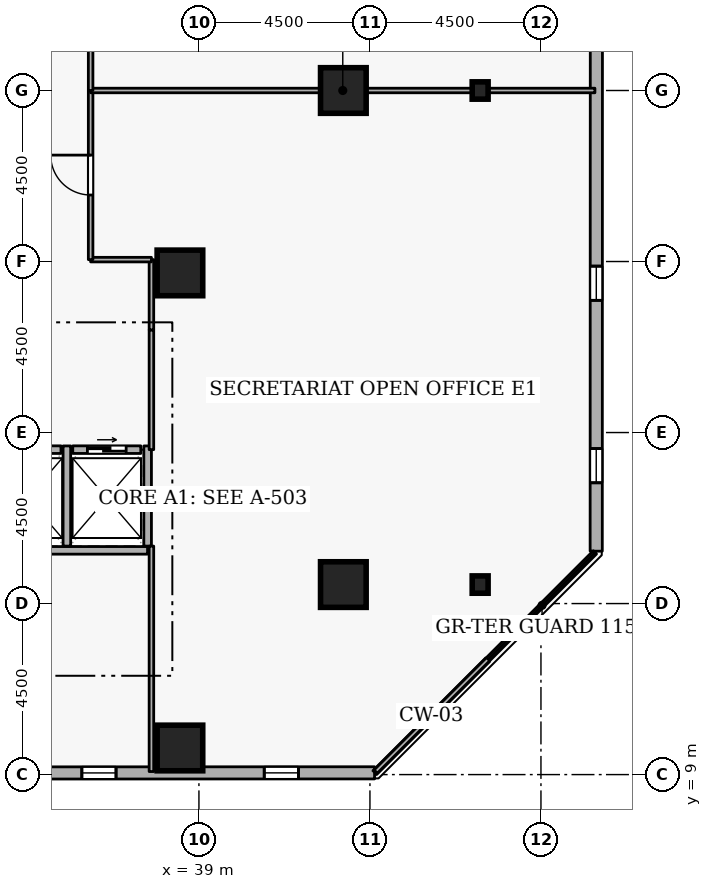
"""IFC4 building model, lengths in metres.
Left out: names, types, materials, properties, quantities, classifications, styles, units other than length and angle.
Written with IfcOpenShell. Run it as: python <this file> out.ifc"""

import sys

from ifc_helpers import new_model, si_unit, direction, frame, frame_2d, origin, origin_2d, place, context, subcontext, project, spatial, rectangle, i_section, extrude, element, fill, save


model = new_model("IFC4")
c1 = context("Model", 3, precision=1e-05, world=origin(), true_north=direction((0.0, 1.0)))
c2 = subcontext(c1, "Body", "Model", "MODEL_VIEW")
j1 = project(units=[si_unit("LENGTHUNIT", "METRE"), si_unit("PLANEANGLEUNIT", "RADIAN")], contexts=[c1])
p1 = place(None, origin())
s1 = spatial("IfcSite", under=j1, at=p1, CompositionType="ELEMENT")
p2 = place(p1, origin())
s2 = spatial("IfcBuilding", under=s1, at=p2, CompositionType="ELEMENT")
p3 = place(p2, frame((0.0, 0.0, 80.1)))
s3 = spatial("IfcBuildingStorey", under=s2, at=p3, CompositionType="ELEMENT", Elevation=80.1)
for number, where, z_axis, x_axis in (
    (1, (38.5, 9.7, 0.0), (0.0, 0.0, 1.0), (1.0, 0.0, 0.0)),
    (2, (42.8, 14.0, 0.0), (0.0, 0.0, 1.0), (1.0, 0.0, 0.0)),
    (3, (42.8, 27.0, 0.0), (0.0, 0.0, 1.0), (1.0, 0.0, 0.0)),
    (4, (38.5, 22.2, 0.0), (0.0, 0.0, 1.0), (1.0, 0.0, 0.0)),
):
    element("IfcColumn", number, at=place(p3, frame(where, z_axis=z_axis, x_axis=x_axis)), inside=s3, PredefinedType="COLUMN", context=c2, shape_type="SweptSolid", body=[
        extrude(rectangle(XDim=1.2, YDim=1.2, at=origin_2d()), origin(), (0.0, 0.0, 1.0), 3.6),
    ])
for number, where, z_axis, x_axis in (
    (5, (46.4, 14.0, 0.0), (0.0, 0.0, 1.0), (1.0, 0.0, 0.0)),
    (6, (46.4, 27.0, 0.0), (0.0, 0.0, 1.0), (1.0, 0.0, 0.0)),
):
    element("IfcColumn", number, at=place(p3, frame(where, z_axis=z_axis, x_axis=x_axis)), inside=s3, PredefinedType="COLUMN", context=c2, shape_type="SweptSolid", body=[
        extrude(i_section(OverallWidth=0.418, OverallDepth=0.456, WebThickness=0.042, FlangeThickness=0.067, FilletRadius=0.015, at=origin_2d()), origin(), (0.0, 0.0, 1.0), 3.6),
    ])
p4 = place(p3, frame((10.119, 9.035, 0.0), z_axis=(0.0, 0.0, 1.0), x_axis=(0.999999950907, 0.000313347115, 0.0)))
e7 = element("IfcWall", 7, at=p4, inside=s3, PredefinedType="STANDARD", context=c2, shape_type="SweptSolid", body=[
    extrude(rectangle(XDim=33.503, YDim=0.32, at=frame_2d((16.751, 0.0))), origin(), (0.0, 0.0, 1.0), 2.7),
])
p5 = place(p4, frame((6.6, 0.0, 0.72)))
e8 = element("IfcOpeningElement", 8, at=p5, cuts=e7, PredefinedType="OPENING", context=c2, shape_type="SweptSolid", body=[
    extrude(rectangle(XDim=0.9, YDim=1.75, at=frame_2d((0.45, 0.875))), frame((0.0, 0.17, 0.0), z_axis=(0.0, -1.0, 0.0), x_axis=(1.0, 0.0, 0.0)), (0.0, 0.0, 1.0), 0.34),
])
p6 = place(p4, frame((11.4, 0.0, 0.72)))
e9 = element("IfcOpeningElement", 9, at=p6, cuts=e7, PredefinedType="OPENING", context=c2, shape_type="SweptSolid", body=[
    extrude(rectangle(XDim=0.9, YDim=1.75, at=frame_2d((0.45, 0.875))), frame((0.0, 0.17, 0.0), z_axis=(0.0, -1.0, 0.0), x_axis=(1.0, 0.0, 0.0)), (0.0, 0.0, 1.0), 0.34),
])
p7 = place(p4, frame((21.0, 0.0, 0.72)))
e10 = element("IfcOpeningElement", 10, at=p7, cuts=e7, PredefinedType="OPENING", context=c2, shape_type="SweptSolid", body=[
    extrude(rectangle(XDim=0.9, YDim=1.75, at=frame_2d((0.45, 0.875))), frame((0.0, 0.17, 0.0), z_axis=(0.0, -1.0, 0.0), x_axis=(1.0, 0.0, 0.0)), (0.0, 0.0, 1.0), 0.34),
])
p8 = place(p4, frame((25.8, 0.0, 0.72)))
e11 = element("IfcOpeningElement", 11, at=p8, cuts=e7, PredefinedType="OPENING", context=c2, shape_type="SweptSolid", body=[
    extrude(rectangle(XDim=0.9, YDim=1.75, at=frame_2d((0.45, 0.875))), frame((0.0, 0.17, 0.0), z_axis=(0.0, -1.0, 0.0), x_axis=(1.0, 0.0, 0.0)), (0.0, 0.0, 1.0), 0.34),
])
p9 = place(p4, frame((30.6, 0.0, 0.72)))
e12 = element("IfcOpeningElement", 12, at=p9, cuts=e7, PredefinedType="OPENING", context=c2, shape_type="SweptSolid", body=[
    extrude(rectangle(XDim=0.9, YDim=1.75, at=frame_2d((0.45, 0.875))), frame((0.0, 0.17, 0.0), z_axis=(0.0, -1.0, 0.0), x_axis=(1.0, 0.0, 0.0)), (0.0, 0.0, 1.0), 0.34),
])
p10 = place(p3, frame((49.454, 14.878, 0.0), z_axis=(0.0, 0.0, 1.0), x_axis=(0.000313347115, 0.999999950907, 0.0)))
e13 = element("IfcWall", 13, at=p10, inside=s3, PredefinedType="STANDARD", context=c2, shape_type="SweptSolid", body=[
    extrude(rectangle(XDim=33.503, YDim=0.32, at=frame_2d((16.751, 0.0))), origin(), (0.0, 0.0, 1.0), 2.7),
])
p11 = place(p10, frame((1.8, 0.0, 0.72)))
e14 = element("IfcOpeningElement", 14, at=p11, cuts=e13, PredefinedType="OPENING", context=c2, shape_type="SweptSolid", body=[
    extrude(rectangle(XDim=0.9, YDim=1.75, at=frame_2d((0.45, 0.875))), frame((0.0, 0.17, 0.0), z_axis=(0.0, -1.0, 0.0), x_axis=(1.0, 0.0, 0.0)), (0.0, 0.0, 1.0), 0.34),
])
p12 = place(p10, frame((6.6, 0.0, 0.72)))
e15 = element("IfcOpeningElement", 15, at=p12, cuts=e13, PredefinedType="OPENING", context=c2, shape_type="SweptSolid", body=[
    extrude(rectangle(XDim=0.9, YDim=1.75, at=frame_2d((0.45, 0.875))), frame((0.0, 0.17, 0.0), z_axis=(0.0, -1.0, 0.0), x_axis=(1.0, 0.0, 0.0)), (0.0, 0.0, 1.0), 0.34),
])
p13 = place(p10, frame((16.2, 0.0, 0.72)))
e16 = element("IfcOpeningElement", 16, at=p13, cuts=e13, PredefinedType="OPENING", context=c2, shape_type="SweptSolid", body=[
    extrude(rectangle(XDim=0.9, YDim=1.75, at=frame_2d((0.45, 0.875))), frame((0.0, 0.17, 0.0), z_axis=(0.0, -1.0, 0.0), x_axis=(1.0, 0.0, 0.0)), (0.0, 0.0, 1.0), 0.34),
])
p14 = place(p10, frame((21.0, 0.0, 0.72)))
e17 = element("IfcOpeningElement", 17, at=p14, cuts=e13, PredefinedType="OPENING", context=c2, shape_type="SweptSolid", body=[
    extrude(rectangle(XDim=0.9, YDim=1.75, at=frame_2d((0.45, 0.875))), frame((0.0, 0.17, 0.0), z_axis=(0.0, -1.0, 0.0), x_axis=(1.0, 0.0, 0.0)), (0.0, 0.0, 1.0), 0.34),
])
p15 = place(p10, frame((25.8, 0.0, 0.72)))
e18 = element("IfcOpeningElement", 18, at=p15, cuts=e13, PredefinedType="OPENING", context=c2, shape_type="SweptSolid", body=[
    extrude(rectangle(XDim=0.9, YDim=1.75, at=frame_2d((0.45, 0.875))), frame((0.0, 0.17, 0.0), z_axis=(0.0, -1.0, 0.0), x_axis=(1.0, 0.0, 0.0)), (0.0, 0.0, 1.0), 0.34),
])
p16 = place(p10, frame((30.6, 0.0, 0.72)))
e19 = element("IfcOpeningElement", 19, at=p16, cuts=e13, PredefinedType="OPENING", context=c2, shape_type="SweptSolid", body=[
    extrude(rectangle(XDim=0.9, YDim=1.75, at=frame_2d((0.45, 0.875))), frame((0.0, 0.17, 0.0), z_axis=(0.0, -1.0, 0.0), x_axis=(1.0, 0.0, 0.0)), (0.0, 0.0, 1.0), 0.34),
])
p17 = place(p3, frame((33.63, 17.55, 0.0), z_axis=(0.0, 0.0, 1.0), x_axis=(1.0, 0.0, 0.0)))
e20 = element("IfcWall", 20, at=p17, inside=s3, PredefinedType="STANDARD", context=c2, shape_type="SweptSolid", body=[
    extrude(rectangle(XDim=1.74, YDim=0.2, at=frame_2d((0.87, 0.0))), origin(), (0.0, 0.0, 1.0), 3.34),
])
p18 = place(p17, frame((0.36, 0.0, 0.0)))
e21 = element("IfcOpeningElement", 21, at=p18, cuts=e20, PredefinedType="OPENING", context=c2, shape_type="SweptSolid", body=[
    extrude(rectangle(XDim=1.02, YDim=2.06, at=frame_2d((0.51, 1.03))), frame((0.0, 0.11, 0.0), z_axis=(0.0, -1.0, 0.0), x_axis=(1.0, 0.0, 0.0)), (0.0, 0.0, 1.0), 0.22),
])
p19 = place(p3, frame((35.68, 17.55, 0.0), z_axis=(0.0, 0.0, 1.0), x_axis=(1.0, 0.0, 0.0)))
e22 = element("IfcWall", 22, at=p19, inside=s3, PredefinedType="STANDARD", context=c2, shape_type="SweptSolid", body=[
    extrude(rectangle(XDim=1.79, YDim=0.2, at=frame_2d((0.895, 0.0))), origin(), (0.0, 0.0, 1.0), 3.34),
])
p20 = place(p19, frame((0.385, 0.0, 0.0)))
e23 = element("IfcOpeningElement", 23, at=p20, cuts=e22, PredefinedType="OPENING", context=c2, shape_type="SweptSolid", body=[
    extrude(rectangle(XDim=1.02, YDim=2.06, at=frame_2d((0.51, 1.03))), frame((0.0, 0.11, 0.0), z_axis=(0.0, -1.0, 0.0), x_axis=(1.0, 0.0, 0.0)), (0.0, 0.0, 1.0), 0.22),
])
p21 = place(p3, frame((33.452, 14.9, 0.0), z_axis=(0.0, 0.0, 1.0), x_axis=(1.0, 0.0, 0.0)))
e24 = element("IfcWall", 24, at=p21, inside=s3, PredefinedType="STANDARD", context=c2, shape_type="SweptSolid", body=[
    extrude(rectangle(XDim=4.196, YDim=0.2, at=frame_2d((2.098, 0.0))), origin(), (0.0, 0.0, 1.0), 3.34),
])
for number, where, z_axis, x_axis in (
    (25, (35.525, 15.012, 0.0), (0.0, 0.0, 1.0), (0.0, 1.0, 0.0)),
    (26, (37.65, 15.012, 0.0), (0.0, 0.0, 1.0), (0.0, 1.0, 0.0)),
):
    element("IfcWall", number, at=place(p3, frame(where, z_axis=z_axis, x_axis=x_axis)), inside=s3, PredefinedType="STANDARD", context=c2, shape_type="SweptSolid", body=[
        extrude(rectangle(XDim=2.636, YDim=0.2, at=frame_2d((1.318, 0.0))), origin(), (0.0, 0.0, 1.0), 3.34),
    ])
p22 = place(p3, frame((37.75, 17.55, 0.0), z_axis=(0.0, 0.0, 1.0), x_axis=(0.0, 1.0, 0.0)))
e27 = element("IfcWall", 27, at=p22, inside=s3, PredefinedType="PARTITIONING", context=c2, shape_type="SweptSolid", body=[
    extrude(rectangle(XDim=3.15, YDim=0.12, at=frame_2d((1.575, 0.0))), origin(), (0.0, 0.0, 1.0), 3.34),
])
p23 = place(p3, frame((37.75, 20.7, 0.0), z_axis=(0.0, 0.0, 1.0), x_axis=(0.0, 1.0, 0.0)))
e28 = element("IfcWall", 28, at=p23, inside=s3, PredefinedType="PARTITIONING", context=c2, shape_type="SweptSolid", body=[
    extrude(rectangle(XDim=1.85, YDim=0.12, at=frame_2d((0.925, 0.0))), origin(), (0.0, 0.0, 1.0), 3.34),
])
p24 = place(p3, frame((37.75, 22.55, 0.0), z_axis=(0.0, 0.0, 1.0), x_axis=(-1.0, 0.0, 0.0)))
e29 = element("IfcWall", 29, at=p24, inside=s3, PredefinedType="PARTITIONING", context=c2, shape_type="SweptSolid", body=[
    extrude(rectangle(XDim=1.6, YDim=0.12, at=frame_2d((0.8, 0.0))), origin(), (0.0, 0.0, 1.0), 3.34),
])
p25 = place(p3, frame((36.15, 22.55, 0.0), z_axis=(0.0, 0.0, 1.0), x_axis=(0.0, 1.0, 0.0)))
e30 = element("IfcWall", 30, at=p25, inside=s3, PredefinedType="PARTITIONING", context=c2, shape_type="SweptSolid", body=[
    extrude(rectangle(XDim=4.45, YDim=0.12, at=frame_2d((2.225, 0.0))), origin(), (0.0, 0.0, 1.0), 3.34),
])
p26 = place(p25, frame((1.7, 0.0, 0.0)))
e31 = element("IfcOpeningElement", 31, at=p26, cuts=e30, PredefinedType="OPENING", context=c2, shape_type="SweptSolid", body=[
    extrude(rectangle(XDim=1.05, YDim=2.1, at=frame_2d((0.525, 1.05))), frame((0.0, 0.07, 0.0), z_axis=(0.0, -1.0, 0.0), x_axis=(1.0, 0.0, 0.0)), (0.0, 0.0, 1.0), 0.14),
])
p27 = place(p3, frame((36.15, 27.0, 0.0), z_axis=(0.0, 0.0, 1.0), x_axis=(1.0, 0.0, 0.0)))
e32 = element("IfcWall", 32, at=p27, inside=s3, PredefinedType="PARTITIONING", context=c2, shape_type="SweptSolid", body=[
    extrude(rectangle(XDim=13.27, YDim=0.12, at=frame_2d((6.635, 0.0))), origin(), (0.0, 0.0, 1.0), 2.882),
])
p28 = place(p3, frame((49.42, 14.848, 0.0), z_axis=(0.0, 0.0, 1.0), x_axis=(-0.707106781187, -0.707106781187, 0.0)))
e33 = element("IfcWall", 33, at=p28, inside=s3, PredefinedType="PARTITIONING", context=c2, shape_type="SweptSolid", body=[
    extrude(rectangle(XDim=8.156, YDim=0.12, at=frame_2d((4.078, 0.0))), origin(), (0.0, 0.0, 1.0), 3.34),
])
p29 = place(p3, frame((37.75, 9.08, 0.0), z_axis=(0.0, 0.0, 1.0), x_axis=(0.0, 1.0, 0.0)))
e34 = element("IfcWall", 34, at=p29, inside=s3, PredefinedType="PARTITIONING", context=c2, shape_type="SweptSolid", body=[
    extrude(rectangle(XDim=5.932, YDim=0.12, at=frame_2d((2.966, 0.0))), origin(), (0.0, 0.0, 1.0), 3.34),
])
p30 = place(p3, frame((36.15, 27.0, 0.0), z_axis=(0.0, 0.0, 1.0), x_axis=(0.0, 1.0, 0.0)))
e35 = element("IfcWall", 35, at=p30, inside=s3, PredefinedType="PARTITIONING", context=c2, shape_type="SweptSolid", body=[
    extrude(rectangle(XDim=4.45, YDim=0.12, at=frame_2d((2.225, 0.0))), origin(), (0.0, 0.0, 1.0), 3.34),
])
p31 = place(p8, origin())
e36 = element("IfcWindow", 36, at=p31, inside=s3, PartitioningType="SINGLE_PANEL", PredefinedType="WINDOW", context=c2, shape_type="SweptSolid", body=[
    extrude(rectangle(XDim=0.9, YDim=1.75, at=frame_2d((0.45, 0.875))), frame((0.0, 0.03, 0.0), z_axis=(0.0, -1.0, 0.0), x_axis=(1.0, 0.0, 0.0)), (0.0, 0.0, 1.0), 0.06),
])
fill(e11, e36)
p32 = place(p9, origin())
e37 = element("IfcWindow", 37, at=p32, inside=s3, PartitioningType="SINGLE_PANEL", PredefinedType="WINDOW", context=c2, shape_type="SweptSolid", body=[
    extrude(rectangle(XDim=0.9, YDim=1.75, at=frame_2d((0.45, 0.875))), frame((0.0, 0.03, 0.0), z_axis=(0.0, -1.0, 0.0), x_axis=(1.0, 0.0, 0.0)), (0.0, 0.0, 1.0), 0.06),
])
fill(e12, e37)
p33 = place(p11, origin())
e38 = element("IfcWindow", 38, at=p33, inside=s3, PartitioningType="SINGLE_PANEL", PredefinedType="WINDOW", context=c2, shape_type="SweptSolid", body=[
    extrude(rectangle(XDim=0.9, YDim=1.75, at=frame_2d((0.45, 0.875))), frame((0.0, 0.03, 0.0), z_axis=(0.0, -1.0, 0.0), x_axis=(1.0, 0.0, 0.0)), (0.0, 0.0, 1.0), 0.06),
])
fill(e14, e38)
p34 = place(p12, origin())
e39 = element("IfcWindow", 39, at=p34, inside=s3, PartitioningType="SINGLE_PANEL", PredefinedType="WINDOW", context=c2, shape_type="SweptSolid", body=[
    extrude(rectangle(XDim=0.9, YDim=1.75, at=frame_2d((0.45, 0.875))), frame((0.0, 0.03, 0.0), z_axis=(0.0, -1.0, 0.0), x_axis=(1.0, 0.0, 0.0)), (0.0, 0.0, 1.0), 0.06),
])
fill(e15, e39)
p35 = place(p20, origin())
e40 = element("IfcDoor", 40, at=p35, inside=s3, OperationType="SLIDING_TO_LEFT", PredefinedType="DOOR", context=c2, shape_type="SweptSolid", body=[
    extrude(rectangle(XDim=1.02, YDim=2.06, at=frame_2d((0.51, 1.03))), frame((0.0, 0.025, 0.0), z_axis=(0.0, -1.0, 0.0), x_axis=(1.0, 0.0, 0.0)), (0.0, 0.0, 1.0), 0.05),
])
fill(e23, e40)
p36 = place(p26, origin())
e41 = element("IfcDoor", 41, at=p36, inside=s3, OperationType="SINGLE_SWING_RIGHT", PredefinedType="DOOR", context=c2, shape_type="SweptSolid", body=[
    extrude(rectangle(XDim=1.05, YDim=2.1, at=frame_2d((0.525, 1.05))), frame((0.0, 0.025, 0.0), z_axis=(0.0, -1.0, 0.0), x_axis=(1.0, 0.0, 0.0)), (0.0, 0.0, 1.0), 0.05),
])
fill(e31, e41)
save(model, sys.argv[1])
